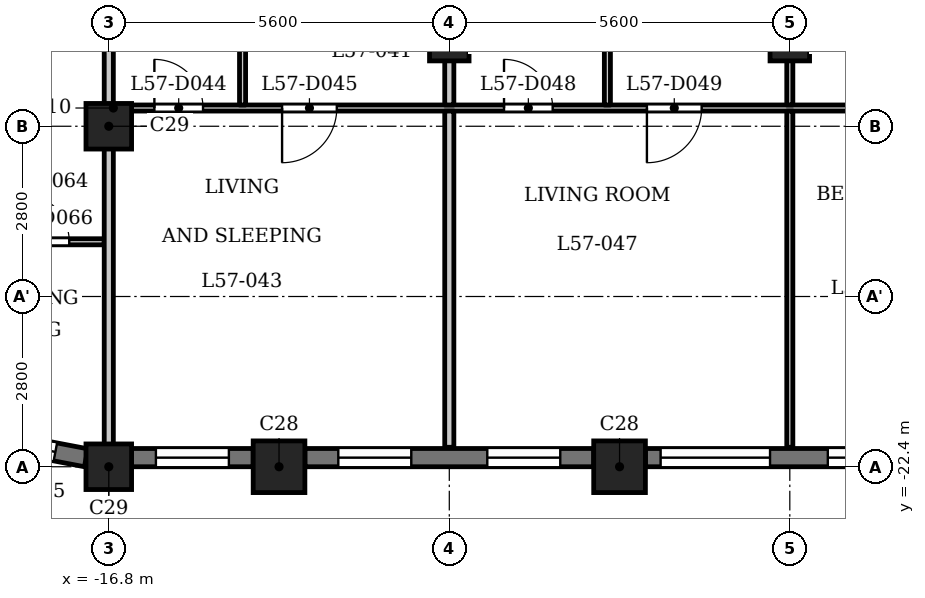
"""IFC4 building model, lengths in metres.
Left out: names, types, materials, properties, quantities, classifications, styles, units other than length and angle.
Written with IfcOpenShell. Run it as: python <this file> out.ifc"""

import sys

from ifc_helpers import new_model, si_unit, direction, frame, frame_2d, origin, origin_2d, place, context, subcontext, project, spatial, rectangle, extrude, element, fill, save


model = new_model("IFC4")
c1 = context("Model", 3, precision=1e-05, world=origin(), true_north=direction((0.0, 1.0)))
c2 = subcontext(c1, "Body", "Model", "MODEL_VIEW")
j1 = project(units=[si_unit("LENGTHUNIT", "METRE"), si_unit("PLANEANGLEUNIT", "RADIAN")], contexts=[c1])
p1 = place(None, origin())
s1 = spatial("IfcSite", under=j1, at=p1, CompositionType="ELEMENT")
p2 = place(p1, origin())
s2 = spatial("IfcBuilding", under=s1, at=p2, CompositionType="ELEMENT")
p3 = place(p2, frame((0.0, 0.0, 220.4)))
s3 = spatial("IfcBuildingStorey", under=s2, at=p3, CompositionType="ELEMENT", Elevation=220.4)
for number, where, z_axis, x_axis in (
    (1, (-14.0, -22.4, 0.0), (0.0, 0.0, 1.0), (1.0, 0.0, 0.0)),
    (2, (-8.4, -22.4, 0.0), (0.0, 0.0, 1.0), (1.0, 0.0, 0.0)),
):
    element("IfcColumn", number, at=place(p3, frame(where, z_axis=z_axis, x_axis=x_axis)), inside=s3, PredefinedType="COLUMN", context=c2, shape_type="SweptSolid", body=[
        extrude(rectangle(XDim=0.85, YDim=0.85, at=origin_2d()), origin(), (0.0, 0.0, 1.0), 3.5),
    ])
for number, where, z_axis, x_axis in (
    (3, (-16.8, -22.4, 0.0), (0.0, 0.0, 1.0), (1.0, 0.0, 0.0)),
    (4, (-16.8, -16.8, 0.0), (0.0, 0.0, 1.0), (1.0, 0.0, 0.0)),
):
    element("IfcColumn", number, at=place(p3, frame(where, z_axis=z_axis, x_axis=x_axis)), inside=s3, PredefinedType="COLUMN", context=c2, shape_type="SweptSolid", body=[
        extrude(rectangle(XDim=0.75, YDim=0.75, at=origin_2d()), origin(), (0.0, 0.0, 1.0), 3.5),
    ])
for number, where, z_axis, x_axis in (
    (5, (-11.2, -15.4, 0.0), (0.0, 0.0, 1.0), (1.0, 0.0, 0.0)),
    (6, (-5.6, -15.4, 0.0), (0.0, 0.0, 1.0), (1.0, 0.0, 0.0)),
):
    element("IfcColumn", number, at=place(p3, frame(where, z_axis=z_axis, x_axis=x_axis)), inside=s3, PredefinedType="COLUMN", context=c2, shape_type="SweptSolid", body=[
        extrude(rectangle(XDim=0.65, YDim=0.65, at=origin_2d()), origin(), (0.0, 0.0, 1.0), 3.5),
    ])
p4 = place(p3, frame((-18.971, -21.91, 0.0), z_axis=(0.0, 0.0, 1.0), x_axis=(0.982300037503, -0.187314271538, 0.0)))
e7 = element("IfcWall", 7, at=p4, inside=s3, PredefinedType="SOLIDWALL", context=c2, shape_type="SweptSolid", body=[
    extrude(rectangle(XDim=1.831, YDim=0.3, at=frame_2d((0.916, 0.0))), origin(), (0.0, 0.0, 1.0), 2.5),
])
p5 = place(p4, frame((0.516, 0.0, 0.6)))
e8 = element("IfcOpeningElement", 8, at=p5, cuts=e7, PredefinedType="OPENING", context=c2, shape_type="SweptSolid", body=[
    extrude(rectangle(XDim=0.8, YDim=1.55, at=frame_2d((0.4, 0.775))), frame((0.0, 0.16, 0.0), z_axis=(0.0, -1.0, 0.0), x_axis=(1.0, 0.0, 0.0)), (0.0, 0.0, 1.0), 0.32),
])
p6 = place(p3, frame((-16.425, -22.25, 0.0), z_axis=(0.0, 0.0, 1.0), x_axis=(1.0, 0.0, 0.0)))
e9 = element("IfcWall", 9, at=p6, inside=s3, PredefinedType="SOLIDWALL", context=c2, shape_type="SweptSolid", body=[
    extrude(rectangle(XDim=2.0, YDim=0.3, at=frame_2d((1.0, 0.0))), origin(), (0.0, 0.0, 1.0), 2.5),
])
p7 = place(p6, frame((0.4, 0.0, 0.6)))
e10 = element("IfcOpeningElement", 10, at=p7, cuts=e9, PredefinedType="OPENING", context=c2, shape_type="SweptSolid", body=[
    extrude(rectangle(XDim=1.2, YDim=1.55, at=frame_2d((0.6, 0.775))), frame((0.0, 0.16, 0.0), z_axis=(0.0, -1.0, 0.0), x_axis=(1.0, 0.0, 0.0)), (0.0, 0.0, 1.0), 0.32),
])
p8 = place(p3, frame((-13.575, -22.25, 0.0), z_axis=(0.0, 0.0, 1.0), x_axis=(1.0, 0.0, 0.0)))
e11 = element("IfcWall", 11, at=p8, inside=s3, PredefinedType="SOLIDWALL", context=c2, shape_type="SweptSolid", body=[
    extrude(rectangle(XDim=4.75, YDim=0.3, at=frame_2d((2.375, 0.0))), origin(), (0.0, 0.0, 1.0), 2.5),
])
p9 = place(p8, frame((0.55, 0.0, 0.6)))
e12 = element("IfcOpeningElement", 12, at=p9, cuts=e11, PredefinedType="OPENING", context=c2, shape_type="SweptSolid", body=[
    extrude(rectangle(XDim=1.2, YDim=1.55, at=frame_2d((0.6, 0.775))), frame((0.0, 0.16, 0.0), z_axis=(0.0, -1.0, 0.0), x_axis=(1.0, 0.0, 0.0)), (0.0, 0.0, 1.0), 0.32),
])
p10 = place(p8, frame((3.0, 0.0, 0.6)))
e13 = element("IfcOpeningElement", 13, at=p10, cuts=e11, PredefinedType="OPENING", context=c2, shape_type="SweptSolid", body=[
    extrude(rectangle(XDim=1.2, YDim=1.55, at=frame_2d((0.6, 0.775))), frame((0.0, 0.16, 0.0), z_axis=(0.0, -1.0, 0.0), x_axis=(1.0, 0.0, 0.0)), (0.0, 0.0, 1.0), 0.32),
])
p11 = place(p3, frame((-7.975, -22.25, 0.0), z_axis=(0.0, 0.0, 1.0), x_axis=(1.0, 0.0, 0.0)))
e14 = element("IfcWall", 14, at=p11, inside=s3, PredefinedType="SOLIDWALL", context=c2, shape_type="SweptSolid", body=[
    extrude(rectangle(XDim=4.75, YDim=0.3, at=frame_2d((2.375, 0.0))), origin(), (0.0, 0.0, 1.0), 2.5),
])
p12 = place(p11, frame((0.25, 0.0, 0.9)))
e15 = element("IfcOpeningElement", 15, at=p12, cuts=e14, PredefinedType="OPENING", context=c2, shape_type="SweptSolid", body=[
    extrude(rectangle(XDim=1.8, YDim=1.25, at=frame_2d((0.9, 0.625))), frame((0.0, 0.16, 0.0), z_axis=(0.0, -1.0, 0.0), x_axis=(1.0, 0.0, 0.0)), (0.0, 0.0, 1.0), 0.32),
])
p13 = place(p11, frame((3.0, 0.0, 0.6)))
e16 = element("IfcOpeningElement", 16, at=p13, cuts=e14, PredefinedType="OPENING", context=c2, shape_type="SweptSolid", body=[
    extrude(rectangle(XDim=1.2, YDim=1.55, at=frame_2d((0.6, 0.775))), frame((0.0, 0.16, 0.0), z_axis=(0.0, -1.0, 0.0), x_axis=(1.0, 0.0, 0.0)), (0.0, 0.0, 1.0), 0.32),
])
p14 = place(p3, frame((-22.856, -18.7, 0.0), z_axis=(0.0, 0.0, 1.0), x_axis=(1.0, 0.0, 0.0)))
e17 = element("IfcWall", 17, at=p14, inside=s3, PredefinedType="PARTITIONING", context=c2, shape_type="SweptSolid", body=[
    extrude(rectangle(XDim=5.981, YDim=0.1, at=frame_2d((2.99, 0.0))), origin(), (0.0, 0.0, 1.0), 3.2),
])
p15 = place(p14, frame((4.606, 0.0, 0.0)))
e18 = element("IfcOpeningElement", 18, at=p15, cuts=e17, PredefinedType="OPENING", context=c2, shape_type="SweptSolid", body=[
    extrude(rectangle(XDim=0.8, YDim=2.1, at=frame_2d((0.4, 1.05))), frame((0.0, 0.06, 0.0), z_axis=(0.0, -1.0, 0.0), x_axis=(1.0, 0.0, 0.0)), (0.0, 0.0, 1.0), 0.12),
])
p16 = place(p14, frame((1.084, 0.0, 0.0)))
e19 = element("IfcOpeningElement", 19, at=p16, cuts=e17, PredefinedType="OPENING", context=c2, shape_type="SweptSolid", body=[
    extrude(rectangle(XDim=0.9, YDim=2.1, at=frame_2d((0.45, 1.05))), frame((0.0, 0.06, 0.0), z_axis=(0.0, -1.0, 0.0), x_axis=(1.0, 0.0, 0.0)), (0.0, 0.0, 1.0), 0.12),
])
p17 = place(p3, frame((-16.725, -16.5, 0.0), z_axis=(0.0, 0.0, 1.0), x_axis=(1.0, 0.0, 0.0)))
e20 = element("IfcWall", 20, at=p17, inside=s3, PredefinedType="PARTITIONING", context=c2, shape_type="SweptSolid", body=[
    extrude(rectangle(XDim=33.45, YDim=0.1, at=frame_2d((16.725, 0.0))), origin(), (0.0, 0.0, 1.0), 3.2),
])
p18 = place(p17, frame((0.675, 0.0, 0.0)))
e21 = element("IfcOpeningElement", 21, at=p18, cuts=e20, PredefinedType="OPENING", context=c2, shape_type="SweptSolid", body=[
    extrude(rectangle(XDim=0.8, YDim=2.1, at=frame_2d((0.4, 1.05))), frame((0.0, 0.06, 0.0), z_axis=(0.0, -1.0, 0.0), x_axis=(1.0, 0.0, 0.0)), (0.0, 0.0, 1.0), 0.12),
])
p19 = place(p17, frame((2.775, 0.0, 0.0)))
e22 = element("IfcOpeningElement", 22, at=p19, cuts=e20, PredefinedType="OPENING", context=c2, shape_type="SweptSolid", body=[
    extrude(rectangle(XDim=0.9, YDim=2.1, at=frame_2d((0.45, 1.05))), frame((0.0, 0.06, 0.0), z_axis=(0.0, -1.0, 0.0), x_axis=(1.0, 0.0, 0.0)), (0.0, 0.0, 1.0), 0.12),
])
p20 = place(p17, frame((6.425, 0.0, 0.0)))
e23 = element("IfcOpeningElement", 23, at=p20, cuts=e20, PredefinedType="OPENING", context=c2, shape_type="SweptSolid", body=[
    extrude(rectangle(XDim=0.8, YDim=2.1, at=frame_2d((0.4, 1.05))), frame((0.0, 0.06, 0.0), z_axis=(0.0, -1.0, 0.0), x_axis=(1.0, 0.0, 0.0)), (0.0, 0.0, 1.0), 0.12),
])
p21 = place(p17, frame((8.775, 0.0, 0.0)))
e24 = element("IfcOpeningElement", 24, at=p21, cuts=e20, PredefinedType="OPENING", context=c2, shape_type="SweptSolid", body=[
    extrude(rectangle(XDim=0.9, YDim=2.1, at=frame_2d((0.45, 1.05))), frame((0.0, 0.06, 0.0), z_axis=(0.0, -1.0, 0.0), x_axis=(1.0, 0.0, 0.0)), (0.0, 0.0, 1.0), 0.12),
])
p22 = place(p17, frame((12.525, 0.0, 0.0)))
e25 = element("IfcOpeningElement", 25, at=p22, cuts=e20, PredefinedType="OPENING", context=c2, shape_type="SweptSolid", body=[
    extrude(rectangle(XDim=0.9, YDim=2.1, at=frame_2d((0.45, 1.05))), frame((0.0, 0.06, 0.0), z_axis=(0.0, -1.0, 0.0), x_axis=(1.0, 0.0, 0.0)), (0.0, 0.0, 1.0), 0.12),
])
p23 = place(p17, frame((14.775, 0.0, 0.0)))
e26 = element("IfcOpeningElement", 26, at=p23, cuts=e20, PredefinedType="OPENING", context=c2, shape_type="SweptSolid", body=[
    extrude(rectangle(XDim=0.9, YDim=2.1, at=frame_2d((0.45, 1.05))), frame((0.0, 0.06, 0.0), z_axis=(0.0, -1.0, 0.0), x_axis=(1.0, 0.0, 0.0)), (0.0, 0.0, 1.0), 0.12),
])
p24 = place(p17, frame((25.475, 0.0, 0.0)))
e27 = element("IfcOpeningElement", 27, at=p24, cuts=e20, PredefinedType="OPENING", context=c2, shape_type="SweptSolid", body=[
    extrude(rectangle(XDim=0.8, YDim=2.1, at=frame_2d((0.4, 1.05))), frame((0.0, 0.06, 0.0), z_axis=(0.0, -1.0, 0.0), x_axis=(1.0, 0.0, 0.0)), (0.0, 0.0, 1.0), 0.12),
])
p25 = place(p17, frame((23.225, 0.0, 0.0)))
e28 = element("IfcOpeningElement", 28, at=p25, cuts=e20, PredefinedType="OPENING", context=c2, shape_type="SweptSolid", body=[
    extrude(rectangle(XDim=0.9, YDim=2.1, at=frame_2d((0.45, 1.05))), frame((0.0, 0.06, 0.0), z_axis=(0.0, -1.0, 0.0), x_axis=(1.0, 0.0, 0.0)), (0.0, 0.0, 1.0), 0.12),
])
p26 = place(p17, frame((17.875, 0.0, 0.0)))
e29 = element("IfcOpeningElement", 29, at=p26, cuts=e20, PredefinedType="OPENING", context=c2, shape_type="SweptSolid", body=[
    extrude(rectangle(XDim=0.9, YDim=2.1, at=frame_2d((0.45, 1.05))), frame((0.0, 0.06, 0.0), z_axis=(0.0, -1.0, 0.0), x_axis=(1.0, 0.0, 0.0)), (0.0, 0.0, 1.0), 0.12),
])
p27 = place(p17, frame((19.975, 0.0, 0.0)))
e30 = element("IfcOpeningElement", 30, at=p27, cuts=e20, PredefinedType="OPENING", context=c2, shape_type="SweptSolid", body=[
    extrude(rectangle(XDim=0.9, YDim=2.1, at=frame_2d((0.45, 1.05))), frame((0.0, 0.06, 0.0), z_axis=(0.0, -1.0, 0.0), x_axis=(1.0, 0.0, 0.0)), (0.0, 0.0, 1.0), 0.12),
])
p28 = place(p17, frame((30.825, 0.0, 0.0)))
e31 = element("IfcOpeningElement", 31, at=p28, cuts=e20, PredefinedType="OPENING", context=c2, shape_type="SweptSolid", body=[
    extrude(rectangle(XDim=0.8, YDim=2.1, at=frame_2d((0.4, 1.05))), frame((0.0, 0.06, 0.0), z_axis=(0.0, -1.0, 0.0), x_axis=(1.0, 0.0, 0.0)), (0.0, 0.0, 1.0), 0.12),
])
p29 = place(p17, frame((29.075, 0.0, 0.0)))
e32 = element("IfcOpeningElement", 32, at=p29, cuts=e20, PredefinedType="OPENING", context=c2, shape_type="SweptSolid", body=[
    extrude(rectangle(XDim=0.9, YDim=2.1, at=frame_2d((0.45, 1.05))), frame((0.0, 0.06, 0.0), z_axis=(0.0, -1.0, 0.0), x_axis=(1.0, 0.0, 0.0)), (0.0, 0.0, 1.0), 0.12),
])
p30 = place(p3, frame((-16.8, -22.31, 0.0), z_axis=(0.0, 0.0, 1.0), x_axis=(0.0, 1.0, 0.0)))
e33 = element("IfcWall", 33, at=p30, inside=s3, PredefinedType="PARTITIONING", context=c2, shape_type="SweptSolid", body=[
    extrude(rectangle(XDim=6.835, YDim=0.15, at=frame_2d((3.417, 0.0))), origin(), (0.0, 0.0, 1.0), 2.55),
])
p31 = place(p3, frame((-14.6, -16.45, 0.0), z_axis=(0.0, 0.0, 1.0), x_axis=(0.0, 1.0, 0.0)))
e34 = element("IfcWall", 34, at=p31, inside=s3, PredefinedType="PARTITIONING", context=c2, shape_type="SweptSolid", body=[
    extrude(rectangle(XDim=3.175, YDim=0.1, at=frame_2d((1.587, 0.0))), origin(), (0.0, 0.0, 1.0), 3.2),
])
p32 = place(p3, frame((-11.2, -22.08, 0.0), z_axis=(0.0, 0.0, 1.0), x_axis=(0.0, 1.0, 0.0)))
e35 = element("IfcWall", 35, at=p32, inside=s3, PredefinedType="PARTITIONING", context=c2, shape_type="SweptSolid", body=[
    extrude(rectangle(XDim=5.53, YDim=0.15, at=frame_2d((2.765, 0.0))), origin(), (0.0, 0.0, 1.0), 3.2),
])
p33 = place(p3, frame((-11.2, -16.45, 0.0), z_axis=(0.0, 0.0, 1.0), x_axis=(0.0, 1.0, 0.0)))
e36 = element("IfcWall", 36, at=p33, inside=s3, PredefinedType="PARTITIONING", context=c2, shape_type="SweptSolid", body=[
    extrude(rectangle(XDim=3.175, YDim=0.15, at=frame_2d((1.587, 0.0))), origin(), (0.0, 0.0, 1.0), 3.2),
])
p34 = place(p3, frame((-8.6, -16.45, 0.0), z_axis=(0.0, 0.0, 1.0), x_axis=(0.0, 1.0, 0.0)))
e37 = element("IfcWall", 37, at=p34, inside=s3, PredefinedType="PARTITIONING", context=c2, shape_type="SweptSolid", body=[
    extrude(rectangle(XDim=3.175, YDim=0.1, at=frame_2d((1.587, 0.0))), origin(), (0.0, 0.0, 1.0), 3.2),
])
p35 = place(p3, frame((-5.6, -22.08, 0.0), z_axis=(0.0, 0.0, 1.0), x_axis=(0.0, 1.0, 0.0)))
e38 = element("IfcWall", 38, at=p35, inside=s3, PredefinedType="PARTITIONING", context=c2, shape_type="SweptSolid", body=[
    extrude(rectangle(XDim=5.53, YDim=0.1, at=frame_2d((2.765, 0.0))), origin(), (0.0, 0.0, 1.0), 3.2),
])
p36 = place(p3, frame((-5.6, -16.45, 0.0), z_axis=(0.0, 0.0, 1.0), x_axis=(0.0, 1.0, 0.0)))
e39 = element("IfcWall", 39, at=p36, inside=s3, PredefinedType="PARTITIONING", context=c2, shape_type="SweptSolid", body=[
    extrude(rectangle(XDim=3.175, YDim=0.1, at=frame_2d((1.587, 0.0))), origin(), (0.0, 0.0, 1.0), 3.2),
])
p37 = place(p36, frame((1.699, 0.0, 0.0)))
e40 = element("IfcOpeningElement", 40, at=p37, cuts=e39, PredefinedType="OPENING", context=c2, shape_type="SweptSolid", body=[
    extrude(rectangle(XDim=0.9, YDim=2.1, at=frame_2d((0.45, 1.05))), frame((0.0, 0.06, 0.0), z_axis=(0.0, -1.0, 0.0), x_axis=(1.0, 0.0, 0.0)), (0.0, 0.0, 1.0), 0.12),
])
p38 = place(p18, origin())
e41 = element("IfcDoor", 41, at=p38, inside=s3, OperationType="SINGLE_SWING_RIGHT", PredefinedType="DOOR", context=c2, shape_type="SweptSolid", body=[
    extrude(rectangle(XDim=0.8, YDim=2.1, at=frame_2d((0.4, 1.05))), frame((0.0, 0.025, 0.0), z_axis=(0.0, -1.0, 0.0), x_axis=(1.0, 0.0, 0.0)), (0.0, 0.0, 1.0), 0.05),
])
fill(e21, e41)
p39 = place(p19, origin())
e42 = element("IfcDoor", 42, at=p39, inside=s3, OperationType="SINGLE_SWING_LEFT", PredefinedType="DOOR", context=c2, shape_type="SweptSolid", body=[
    extrude(rectangle(XDim=0.9, YDim=2.1, at=frame_2d((0.45, 1.05))), frame((0.0, 0.025, 0.0), z_axis=(0.0, -1.0, 0.0), x_axis=(1.0, 0.0, 0.0)), (0.0, 0.0, 1.0), 0.05),
])
fill(e22, e42)
p40 = place(p20, origin())
e43 = element("IfcDoor", 43, at=p40, inside=s3, OperationType="SINGLE_SWING_RIGHT", PredefinedType="DOOR", context=c2, shape_type="SweptSolid", body=[
    extrude(rectangle(XDim=0.8, YDim=2.1, at=frame_2d((0.4, 1.05))), frame((0.0, 0.025, 0.0), z_axis=(0.0, -1.0, 0.0), x_axis=(1.0, 0.0, 0.0)), (0.0, 0.0, 1.0), 0.05),
])
fill(e23, e43)
p41 = place(p21, origin())
e44 = element("IfcDoor", 44, at=p41, inside=s3, OperationType="SINGLE_SWING_LEFT", PredefinedType="DOOR", context=c2, shape_type="SweptSolid", body=[
    extrude(rectangle(XDim=0.9, YDim=2.1, at=frame_2d((0.45, 1.05))), frame((0.0, 0.025, 0.0), z_axis=(0.0, -1.0, 0.0), x_axis=(1.0, 0.0, 0.0)), (0.0, 0.0, 1.0), 0.05),
])
fill(e24, e44)
p42 = place(p15, origin())
e45 = element("IfcDoor", 45, at=p42, inside=s3, OperationType="SINGLE_SWING_RIGHT", PredefinedType="DOOR", context=c2, shape_type="SweptSolid", body=[
    extrude(rectangle(XDim=0.8, YDim=2.1, at=frame_2d((0.4, 1.05))), frame((0.0, 0.025, 0.0), z_axis=(0.0, -1.0, 0.0), x_axis=(1.0, 0.0, 0.0)), (0.0, 0.0, 1.0), 0.05),
])
fill(e18, e45)
p43 = place(p5, origin())
e46 = element("IfcWindow", 46, at=p43, inside=s3, PartitioningType="SINGLE_PANEL", PredefinedType="WINDOW", context=c2, shape_type="SweptSolid", body=[
    extrude(rectangle(XDim=0.8, YDim=1.55, at=frame_2d((0.4, 0.775))), frame((0.0, 0.03, 0.0), z_axis=(0.0, -1.0, 0.0), x_axis=(1.0, 0.0, 0.0)), (0.0, 0.0, 1.0), 0.06),
])
fill(e8, e46)
p44 = place(p7, origin())
e47 = element("IfcWindow", 47, at=p44, inside=s3, PartitioningType="SINGLE_PANEL", PredefinedType="WINDOW", context=c2, shape_type="SweptSolid", body=[
    extrude(rectangle(XDim=1.2, YDim=1.55, at=frame_2d((0.6, 0.775))), frame((0.0, 0.03, 0.0), z_axis=(0.0, -1.0, 0.0), x_axis=(1.0, 0.0, 0.0)), (0.0, 0.0, 1.0), 0.06),
])
fill(e10, e47)
p45 = place(p9, origin())
e48 = element("IfcWindow", 48, at=p45, inside=s3, PartitioningType="SINGLE_PANEL", PredefinedType="WINDOW", context=c2, shape_type="SweptSolid", body=[
    extrude(rectangle(XDim=1.2, YDim=1.55, at=frame_2d((0.6, 0.775))), frame((0.0, 0.03, 0.0), z_axis=(0.0, -1.0, 0.0), x_axis=(1.0, 0.0, 0.0)), (0.0, 0.0, 1.0), 0.06),
])
fill(e12, e48)
p46 = place(p10, origin())
e49 = element("IfcWindow", 49, at=p46, inside=s3, PartitioningType="SINGLE_PANEL", PredefinedType="WINDOW", context=c2, shape_type="SweptSolid", body=[
    extrude(rectangle(XDim=1.2, YDim=1.55, at=frame_2d((0.6, 0.775))), frame((0.0, 0.03, 0.0), z_axis=(0.0, -1.0, 0.0), x_axis=(1.0, 0.0, 0.0)), (0.0, 0.0, 1.0), 0.06),
])
fill(e13, e49)
p47 = place(p12, origin())
e50 = element("IfcWindow", 50, at=p47, inside=s3, PartitioningType="SINGLE_PANEL", PredefinedType="WINDOW", context=c2, shape_type="SweptSolid", body=[
    extrude(rectangle(XDim=1.8, YDim=1.25, at=frame_2d((0.9, 0.625))), frame((0.0, 0.03, 0.0), z_axis=(0.0, -1.0, 0.0), x_axis=(1.0, 0.0, 0.0)), (0.0, 0.0, 1.0), 0.06),
])
fill(e15, e50)
p48 = place(p13, origin())
e51 = element("IfcWindow", 51, at=p48, inside=s3, PartitioningType="SINGLE_PANEL", PredefinedType="WINDOW", context=c2, shape_type="SweptSolid", body=[
    extrude(rectangle(XDim=1.2, YDim=1.55, at=frame_2d((0.6, 0.775))), frame((0.0, 0.03, 0.0), z_axis=(0.0, -1.0, 0.0), x_axis=(1.0, 0.0, 0.0)), (0.0, 0.0, 1.0), 0.06),
])
fill(e16, e51)
save(model, sys.argv[1])
